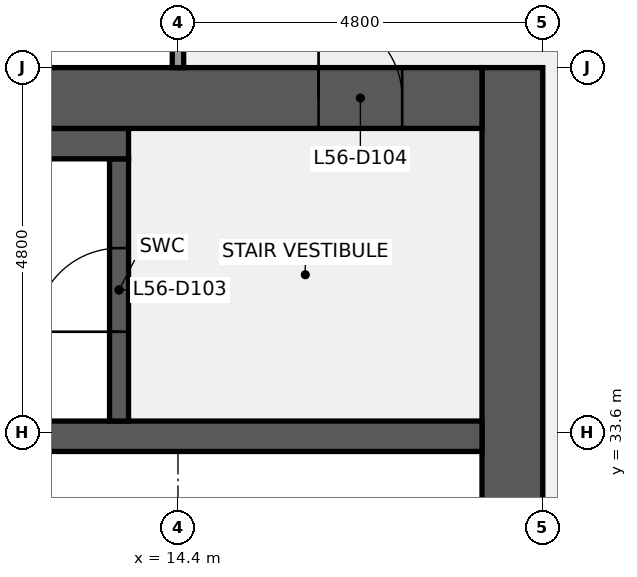
"""IFC4 building model, lengths in metres.
Left out: names, types, materials, properties, quantities, classifications, styles, units other than length and angle.
Written with IfcOpenShell. Run it as: python <this file> out.ifc"""

import sys

from ifc_helpers import new_model, si_unit, direction, frame, frame_2d, origin, place, context, subcontext, project, spatial, rectangle, extrude, element, fill, save


model = new_model("IFC4")
c1 = context("Model", 3, precision=1e-05, world=origin(), true_north=direction((0.0, 1.0)))
c2 = subcontext(c1, "Body", "Model", "MODEL_VIEW")
j1 = project(units=[si_unit("LENGTHUNIT", "METRE"), si_unit("PLANEANGLEUNIT", "RADIAN")], contexts=[c1])
p1 = place(None, origin())
s1 = spatial("IfcSite", under=j1, at=p1, CompositionType="ELEMENT")
p2 = place(p1, origin())
s2 = spatial("IfcBuilding", under=s1, at=p2, CompositionType="ELEMENT")
p3 = place(p2, frame((0.0, 0.0, 253.2)))
s3 = spatial("IfcBuildingStorey", under=s2, at=p3, CompositionType="ELEMENT", Elevation=253.2)
p4 = place(p3, frame((18.8, 38.4, 0.0), z_axis=(0.0, 0.0, 1.0), x_axis=(0.0, -1.0, 0.0)))
e1 = element("IfcWall", 1, at=p4, inside=s3, PredefinedType="SHEAR", context=c2, shape_type="SweptSolid", body=[
    extrude(rectangle(XDim=28.8, YDim=0.8, at=frame_2d((14.4, 0.0))), origin(), (0.0, 0.0, 1.0), 3.84),
])
p5 = place(p4, frame((18.3, 0.0, 0.0)))
e2 = element("IfcOpeningElement", 2, at=p5, cuts=e1, PredefinedType="OPENING", context=c2, shape_type="SweptSolid", body=[
    extrude(rectangle(XDim=1.8, YDim=2.1, at=frame_2d((0.9, 1.05))), frame((0.0, 0.41, 0.0), z_axis=(0.0, -1.0, 0.0), x_axis=(1.0, 0.0, 0.0)), (0.0, 0.0, 1.0), 0.82),
])
p6 = place(p4, frame((8.7, 0.0, 0.0)))
e3 = element("IfcOpeningElement", 3, at=p6, cuts=e1, PredefinedType="OPENING", context=c2, shape_type="SweptSolid", body=[
    extrude(rectangle(XDim=1.8, YDim=2.1, at=frame_2d((0.9, 1.05))), frame((0.0, 0.41, 0.0), z_axis=(0.0, -1.0, 0.0), x_axis=(1.0, 0.0, 0.0)), (0.0, 0.0, 1.0), 0.82),
])
p7 = place(p3, frame((0.8, 33.55, 0.0), z_axis=(0.0, 0.0, 1.0), x_axis=(1.0, 0.0, 0.0)))
e4 = element("IfcWall", 4, at=p7, inside=s3, PredefinedType="SHEAR", context=c2, shape_type="SweptSolid", body=[
    extrude(rectangle(XDim=17.6, YDim=0.4, at=frame_2d((8.8, 0.0))), origin(), (0.0, 0.0, 1.0), 3.84),
])
p8 = place(p3, frame((13.625, 33.75, 0.0), z_axis=(0.0, 0.0, 1.0), x_axis=(0.0, 1.0, 0.0)))
e5 = element("IfcWall", 5, at=p8, inside=s3, PredefinedType="SHEAR", context=c2, shape_type="SweptSolid", body=[
    extrude(rectangle(XDim=3.45, YDim=0.25, at=frame_2d((1.725, 0.0))), origin(), (0.0, 0.0, 1.0), 3.84),
])
p9 = place(p8, frame((1.175, 0.0, 0.0)))
e6 = element("IfcOpeningElement", 6, at=p9, cuts=e5, PredefinedType="OPENING", context=c2, shape_type="SweptSolid", body=[
    extrude(rectangle(XDim=1.1, YDim=2.1, at=frame_2d((0.55, 1.05))), frame((0.0, 0.135, 0.0), z_axis=(0.0, -1.0, 0.0), x_axis=(1.0, 0.0, 0.0)), (0.0, 0.0, 1.0), 0.27),
])
p10 = place(p3, frame((9.6, 37.4, 0.0), z_axis=(0.0, 0.0, 1.0), x_axis=(1.0, 0.0, 0.0)))
e7 = element("IfcWall", 7, at=p10, inside=s3, PredefinedType="SHEAR", context=c2, shape_type="SweptSolid", body=[
    extrude(rectangle(XDim=4.15, YDim=0.4, at=frame_2d((2.075, 0.0))), origin(), (0.0, 0.0, 1.0), 3.84),
])
p11 = place(p3, frame((9.6, 38.0, 0.0), z_axis=(0.0, 0.0, 1.0), x_axis=(1.0, 0.0, 0.0)))
e8 = element("IfcWall", 8, at=p11, inside=s3, PredefinedType="SHEAR", context=c2, shape_type="SweptSolid", body=[
    extrude(rectangle(XDim=8.8, YDim=0.8, at=frame_2d((4.4, 0.0))), origin(), (0.0, 0.0, 1.0), 3.84),
])
p12 = place(p11, frame((6.65, 0.0, 0.0)))
e9 = element("IfcOpeningElement", 9, at=p12, cuts=e8, PredefinedType="OPENING", context=c2, shape_type="SweptSolid", body=[
    extrude(rectangle(XDim=1.1, YDim=2.1, at=frame_2d((0.55, 1.05))), frame((0.0, 0.41, 0.0), z_axis=(0.0, -1.0, 0.0), x_axis=(1.0, 0.0, 0.0)), (0.0, 0.0, 1.0), 0.82),
])
p13 = place(p3, frame((14.4, 38.4, 0.0), z_axis=(0.0, 0.0, 1.0), x_axis=(0.0, 1.0, 0.0)))
e10 = element("IfcWall", 10, at=p13, inside=s3, PredefinedType="PARTITIONING", context=c2, shape_type="SweptSolid", body=[
    extrude(rectangle(XDim=2.325, YDim=0.15, at=frame_2d((1.163, 0.0))), origin(), (0.0, 0.0, 1.0), 2.849),
])
p14 = place(p13, frame((0.663, 0.0, 0.0)))
e11 = element("IfcOpeningElement", 11, at=p14, cuts=e10, PredefinedType="OPENING", context=c2, shape_type="SweptSolid", body=[
    extrude(rectangle(XDim=1.0, YDim=2.1, at=frame_2d((0.5, 1.05))), frame((0.0, 0.085, 0.0), z_axis=(0.0, -1.0, 0.0), x_axis=(1.0, 0.0, 0.0)), (0.0, 0.0, 1.0), 0.17),
])
p15 = place(p9, origin())
e12 = element("IfcDoor", 12, at=p15, inside=s3, OperationType="SINGLE_SWING_LEFT", PredefinedType="DOOR", context=c2, shape_type="SweptSolid", body=[
    extrude(rectangle(XDim=1.1, YDim=2.1, at=frame_2d((0.55, 1.05))), frame((0.0, 0.025, 0.0), z_axis=(0.0, -1.0, 0.0), x_axis=(1.0, 0.0, 0.0)), (0.0, 0.0, 1.0), 0.05),
])
fill(e6, e12)
p16 = place(p12, origin())
e13 = element("IfcDoor", 13, at=p16, inside=s3, OperationType="SINGLE_SWING_LEFT", PredefinedType="DOOR", context=c2, shape_type="SweptSolid", body=[
    extrude(rectangle(XDim=1.1, YDim=2.1, at=frame_2d((0.55, 1.05))), frame((0.0, 0.025, 0.0), z_axis=(0.0, -1.0, 0.0), x_axis=(1.0, 0.0, 0.0)), (0.0, 0.0, 1.0), 0.05),
])
fill(e9, e13)
save(model, sys.argv[1])
